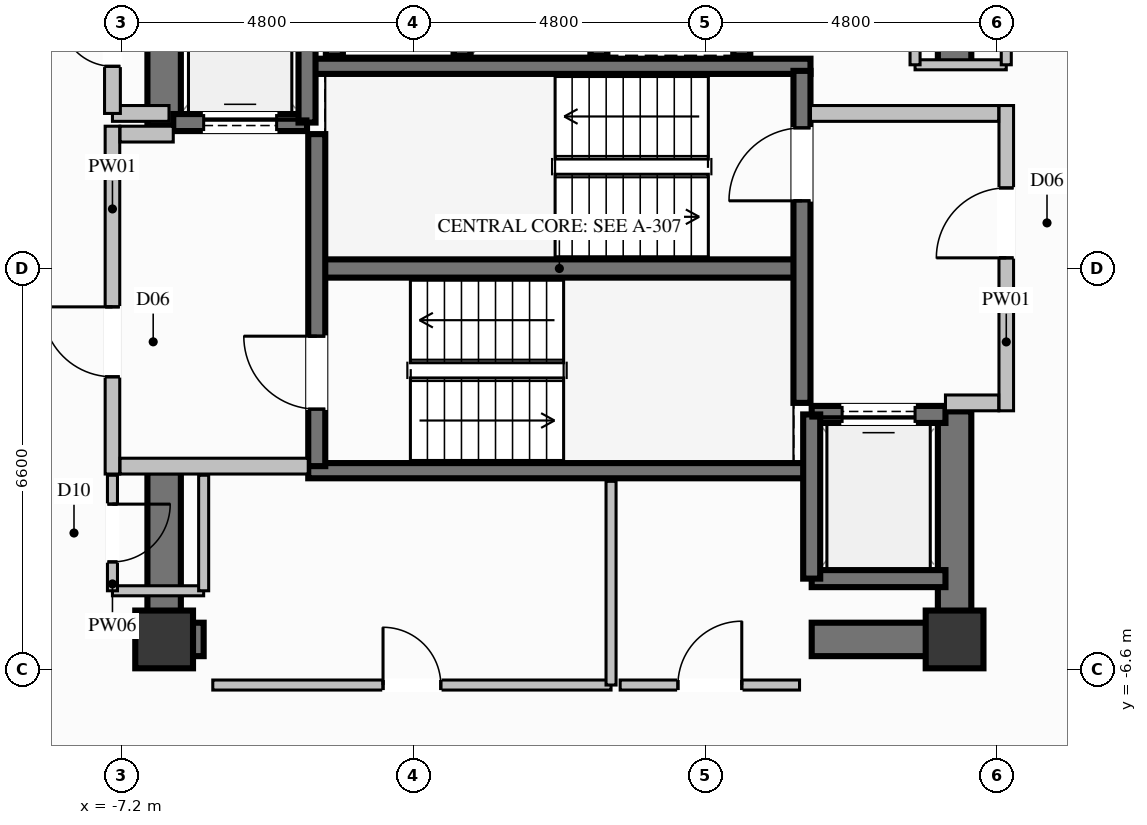
"""IFC4 building model, lengths in metres.
Left out: names, types, materials, properties, quantities, classifications, styles, units other than length and angle.
Written with IfcOpenShell. Run it as: python <this file> out.ifc"""

import sys

from ifc_helpers import new_model, si_unit, direction, frame, frame_2d, origin, origin_2d, place, context, subcontext, project, spatial, rectangle, extrude, element, fill, save


model = new_model("IFC4")
c1 = context("Model", 3, precision=1e-05, world=origin(), true_north=direction((0.0, 1.0)))
c2 = subcontext(c1, "Body", "Model", "MODEL_VIEW")
j1 = project(units=[si_unit("LENGTHUNIT", "METRE"), si_unit("PLANEANGLEUNIT", "RADIAN")], contexts=[c1])
p1 = place(None, origin())
s1 = spatial("IfcSite", under=j1, at=p1, CompositionType="ELEMENT")
p2 = place(p1, origin())
s2 = spatial("IfcBuilding", under=s1, at=p2, CompositionType="ELEMENT")
p3 = place(p2, frame((0.0, 0.0, 205.6)))
s3 = spatial("IfcBuildingStorey", under=s2, at=p3, CompositionType="ELEMENT", Elevation=205.6)
for number, where, z_axis, x_axis in (
    (1, (-6.5, -6.1, 0.0), (0.0, 0.0, 1.0), (1.0, 0.0, 0.0)),
    (2, (6.5, -6.1, 0.0), (0.0, 0.0, 1.0), (1.0, 0.0, 0.0)),
):
    element("IfcColumn", number, at=place(p3, frame(where, z_axis=z_axis, x_axis=x_axis)), inside=s3, PredefinedType="COLUMN", context=c2, shape_type="SweptSolid", body=[
        extrude(rectangle(XDim=0.95, YDim=0.95, at=origin_2d()), origin(), (0.0, 0.0, 1.0), 3.6),
    ])
p4 = place(p3, frame((-3.99, 0.0, 0.0), z_axis=(0.0, 0.0, 1.0), x_axis=(1.0, 0.0, 0.0)))
e3 = element("IfcWall", 3, at=p4, inside=s3, PredefinedType="SHEAR", context=c2, shape_type="SweptSolid", body=[
    extrude(rectangle(XDim=7.98, YDim=0.3, at=frame_2d((3.99, 0.0))), origin(), (0.0, 0.0, 1.0), 3.6),
])
for number, where, z_axis, x_axis in (
    (4, (-4.13, -3.325, 0.0), (0.0, 0.0, 1.0), (1.0, 0.0, 0.0)),
    (5, (-4.13, 3.325, 0.0), (0.0, 0.0, 1.0), (1.0, 0.0, 0.0)),
):
    element("IfcWall", number, at=place(p3, frame(where, z_axis=z_axis, x_axis=x_axis)), inside=s3, PredefinedType="SOLIDWALL", context=c2, shape_type="SweptSolid", body=[
        extrude(rectangle(XDim=8.26, YDim=0.25, at=frame_2d((4.13, 0.0))), origin(), (0.0, 0.0, 1.0), 3.6),
    ])
p5 = place(p3, frame((-6.225, -6.1, 0.0), z_axis=(0.0, 0.0, 1.0), x_axis=(1.0, 0.0, 0.0)))
e6 = element("IfcWall", 6, at=p5, inside=s3, PredefinedType="SHEAR", context=c2, shape_type="SweptSolid", body=[
    extrude(rectangle(XDim=0.375, YDim=0.55, at=frame_2d((0.188, 0.0))), origin(), (0.0, 0.0, 1.0), 3.6),
])
p6 = place(p3, frame((4.15, -6.1, 0.0), z_axis=(0.0, 0.0, 1.0), x_axis=(1.0, 0.0, 0.0)))
e7 = element("IfcWall", 7, at=p6, inside=s3, PredefinedType="SHEAR", context=c2, shape_type="SweptSolid", body=[
    extrude(rectangle(XDim=2.075, YDim=0.55, at=frame_2d((1.038, 0.0))), origin(), (0.0, 0.0, 1.0), 3.6),
])
p7 = place(p3, frame((-6.5, 2.35, 0.0), z_axis=(0.0, 0.0, 1.0), x_axis=(0.0, 1.0, 0.0)))
e8 = element("IfcWall", 8, at=p7, inside=s3, PredefinedType="SHEAR", context=c2, shape_type="SweptSolid", body=[
    extrude(rectangle(XDim=4.025, YDim=0.55, at=frame_2d((2.012, 0.0))), origin(), (0.0, 0.0, 1.0), 3.6),
])
p8 = place(p3, frame((-6.5, -6.375, 0.0), z_axis=(0.0, 0.0, 1.0), x_axis=(0.0, 1.0, 0.0)))
e9 = element("IfcWall", 9, at=p8, inside=s3, PredefinedType="SHEAR", context=c2, shape_type="SweptSolid", body=[
    extrude(rectangle(XDim=3.025, YDim=0.55, at=frame_2d((1.512, 0.0))), origin(), (0.0, 0.0, 1.0), 3.6),
])
p9 = place(p3, frame((6.5, -6.375, 0.0), z_axis=(0.0, 0.0, 1.0), x_axis=(0.0, 1.0, 0.0)))
e10 = element("IfcWall", 10, at=p9, inside=s3, PredefinedType="SHEAR", context=c2, shape_type="SweptSolid", body=[
    extrude(rectangle(XDim=4.025, YDim=0.55, at=frame_2d((2.012, 0.0))), origin(), (0.0, 0.0, 1.0), 3.6),
])
p10 = place(p3, frame((6.5, 3.35, 0.0), z_axis=(0.0, 0.0, 1.0), x_axis=(0.0, 1.0, 0.0)))
e11 = element("IfcWall", 11, at=p10, inside=s3, PredefinedType="SHEAR", context=c2, shape_type="SweptSolid", body=[
    extrude(rectangle(XDim=3.025, YDim=0.55, at=frame_2d((1.512, 0.0))), origin(), (0.0, 0.0, 1.0), 3.6),
])
for number, where, z_axis, x_axis in (
    (12, (-3.7, 6.0, 0.0), (0.0, 0.0, 1.0), (0.0, -1.0, 0.0)),
    (13, (-1.6, 3.5, 0.0), (0.0, 0.0, 1.0), (0.0, 1.0, 0.0)),
    (14, (0.65, 3.5, 0.0), (0.0, 0.0, 1.0), (0.0, 1.0, 0.0)),
    (15, (3.0, 3.5, 0.0), (0.0, 0.0, 1.0), (0.0, 1.0, 0.0)),
):
    element("IfcWall", number, at=place(p3, frame(where, z_axis=z_axis, x_axis=x_axis)), inside=s3, PredefinedType="SOLIDWALL", context=c2, shape_type="SweptSolid", body=[
        extrude(rectangle(XDim=2.5, YDim=0.28, at=frame_2d((1.25, 0.0))), origin(), (0.0, 0.0, 1.0), 3.36),
    ])
p11 = place(p3, frame((-6.35, 2.4, 0.0), z_axis=(0.0, 0.0, 1.0), x_axis=(1.0, 0.0, 0.0)))
e16 = element("IfcWall", 16, at=p11, inside=s3, PredefinedType="SOLIDWALL", context=c2, shape_type="SweptSolid", body=[
    extrude(rectangle(XDim=2.2, YDim=0.28, at=frame_2d((1.1, 0.0))), origin(), (0.0, 0.0, 1.0), 3.36),
])
p12 = place(p11, frame((0.5, 0.0, 0.0)))
e17 = element("IfcOpeningElement", 17, at=p12, cuts=e16, PredefinedType="OPENING", context=c2, shape_type="SweptSolid", body=[
    extrude(rectangle(XDim=1.2, YDim=2.2, at=frame_2d((0.6, 1.1))), frame((0.0, 0.15, 0.0), z_axis=(0.0, -1.0, 0.0), x_axis=(1.0, 0.0, 0.0)), (0.0, 0.0, 1.0), 0.3),
])
p13 = place(p3, frame((-4.15, 2.4, 0.0), z_axis=(0.0, 0.0, 1.0), x_axis=(0.0, 1.0, 0.0)))
e18 = element("IfcWall", 18, at=p13, inside=s3, PredefinedType="SOLIDWALL", context=c2, shape_type="SweptSolid", body=[
    extrude(rectangle(XDim=2.7, YDim=0.28, at=frame_2d((1.35, 0.0))), origin(), (0.0, 0.0, 1.0), 3.36),
])
p14 = place(p3, frame((4.15, -5.1, 0.0), z_axis=(0.0, 0.0, 1.0), x_axis=(1.0, 0.0, 0.0)))
e19 = element("IfcWall", 19, at=p14, inside=s3, PredefinedType="SOLIDWALL", context=c2, shape_type="SweptSolid", body=[
    extrude(rectangle(XDim=2.2, YDim=0.28, at=frame_2d((1.1, 0.0))), origin(), (0.0, 0.0, 1.0), 3.36),
])
p15 = place(p3, frame((6.35, -2.4, 0.0), z_axis=(0.0, 0.0, 1.0), x_axis=(-1.0, 0.0, 0.0)))
e20 = element("IfcWall", 20, at=p15, inside=s3, PredefinedType="SOLIDWALL", context=c2, shape_type="SweptSolid", body=[
    extrude(rectangle(XDim=2.2, YDim=0.28, at=frame_2d((1.1, 0.0))), origin(), (0.0, 0.0, 1.0), 3.36),
])
p16 = place(p15, frame((0.5, 0.0, 0.0)))
e21 = element("IfcOpeningElement", 21, at=p16, cuts=e20, PredefinedType="OPENING", context=c2, shape_type="SweptSolid", body=[
    extrude(rectangle(XDim=1.2, YDim=2.2, at=frame_2d((0.6, 1.1))), frame((0.0, 0.15, 0.0), z_axis=(0.0, -1.0, 0.0), x_axis=(1.0, 0.0, 0.0)), (0.0, 0.0, 1.0), 0.3),
])
p17 = place(p3, frame((4.15, -2.4, 0.0), z_axis=(0.0, 0.0, 1.0), x_axis=(0.0, -1.0, 0.0)))
e22 = element("IfcWall", 22, at=p17, inside=s3, PredefinedType="SOLIDWALL", context=c2, shape_type="SweptSolid", body=[
    extrude(rectangle(XDim=2.7, YDim=0.28, at=frame_2d((1.35, 0.0))), origin(), (0.0, 0.0, 1.0), 3.36),
])
p18 = place(p3, frame((-3.99, -3.25, 0.0), z_axis=(0.0, 0.0, 1.0), x_axis=(0.0, 1.0, 0.0)))
e23 = element("IfcWall", 23, at=p18, inside=s3, PredefinedType="SOLIDWALL", context=c2, shape_type="SweptSolid", body=[
    extrude(rectangle(XDim=5.46, YDim=0.28, at=frame_2d((2.73, 0.0))), origin(), (0.0, 0.0, 1.0), 3.36),
])
p19 = place(p18, frame((0.937, 0.0, 0.0)))
e24 = element("IfcOpeningElement", 24, at=p19, cuts=e23, PredefinedType="OPENING", context=c2, shape_type="SweptSolid", body=[
    extrude(rectangle(XDim=1.2, YDim=2.2, at=frame_2d((0.6, 1.1))), frame((0.0, 0.15, 0.0), z_axis=(0.0, -1.0, 0.0), x_axis=(1.0, 0.0, 0.0)), (0.0, 0.0, 1.0), 0.3),
])
p20 = place(p3, frame((3.99, -2.21, 0.0), z_axis=(0.0, 0.0, 1.0), x_axis=(0.0, 1.0, 0.0)))
e25 = element("IfcWall", 25, at=p20, inside=s3, PredefinedType="SOLIDWALL", context=c2, shape_type="SweptSolid", body=[
    extrude(rectangle(XDim=5.46, YDim=0.28, at=frame_2d((2.73, 0.0))), origin(), (0.0, 0.0, 1.0), 3.36),
])
p21 = place(p20, frame((3.323, 0.0, 0.0)))
e26 = element("IfcOpeningElement", 26, at=p21, cuts=e25, PredefinedType="OPENING", context=c2, shape_type="SweptSolid", body=[
    extrude(rectangle(XDim=1.2, YDim=2.2, at=frame_2d((0.6, 1.1))), frame((0.0, 0.15, 0.0), z_axis=(0.0, -1.0, 0.0), x_axis=(1.0, 0.0, 0.0)), (0.0, 0.0, 1.0), 0.3),
])
p22 = place(p3, frame((-7.35, -3.38, 0.0), z_axis=(0.0, 0.0, 1.0), x_axis=(0.0, 1.0, 0.0)))
e27 = element("IfcWall", 27, at=p22, inside=s3, PredefinedType="PARTITIONING", context=c2, shape_type="SweptSolid", body=[
    extrude(rectangle(XDim=5.72, YDim=0.24, at=frame_2d((2.86, 0.0))), origin(), (0.0, 0.0, 1.0), 2.445),
])
p23 = place(p22, frame((1.599, 0.0, 0.0)))
e28 = element("IfcOpeningElement", 28, at=p23, cuts=e27, PredefinedType="OPENING", context=c2, shape_type="SweptSolid", body=[
    extrude(rectangle(XDim=1.15, YDim=2.2, at=frame_2d((0.575, 1.1))), frame((0.0, 0.13, 0.0), z_axis=(0.0, -1.0, 0.0), x_axis=(1.0, 0.0, 0.0)), (0.0, 0.0, 1.0), 0.26),
])
p24 = place(p3, frame((-7.225, -3.25, 0.0), z_axis=(0.0, 0.0, 1.0), x_axis=(1.0, 0.0, 0.0)))
e29 = element("IfcWall", 29, at=p24, inside=s3, PredefinedType="PARTITIONING", context=c2, shape_type="SweptSolid", body=[
    extrude(rectangle(XDim=3.095, YDim=0.26, at=frame_2d((1.548, 0.0))), origin(), (0.0, 0.0, 1.0), 3.36),
])
p25 = place(p3, frame((-7.225, 2.21, 0.0), z_axis=(0.0, 0.0, 1.0), x_axis=(1.0, 0.0, 0.0)))
e30 = element("IfcWall", 30, at=p25, inside=s3, PredefinedType="PARTITIONING", context=c2, shape_type="SweptSolid", body=[
    extrude(rectangle(XDim=0.875, YDim=0.26, at=frame_2d((0.438, 0.0))), origin(), (0.0, 0.0, 1.0), 3.36),
])
p26 = place(p3, frame((7.35, -2.34, 0.0), z_axis=(0.0, 0.0, 1.0), x_axis=(0.0, 1.0, 0.0)))
e31 = element("IfcWall", 31, at=p26, inside=s3, PredefinedType="PARTITIONING", context=c2, shape_type="SweptSolid", body=[
    extrude(rectangle(XDim=5.02, YDim=0.24, at=frame_2d((2.51, 0.0))), origin(), (0.0, 0.0, 1.0), 2.445),
])
p27 = place(p26, frame((2.515, 0.0, 0.0)))
e32 = element("IfcOpeningElement", 32, at=p27, cuts=e31, PredefinedType="OPENING", context=c2, shape_type="SweptSolid", body=[
    extrude(rectangle(XDim=1.15, YDim=2.2, at=frame_2d((0.575, 1.1))), frame((0.0, 0.13, 0.0), z_axis=(0.0, -1.0, 0.0), x_axis=(1.0, 0.0, 0.0)), (0.0, 0.0, 1.0), 0.26),
])
p28 = place(p3, frame((6.35, -2.21, 0.0), z_axis=(0.0, 0.0, 1.0), x_axis=(1.0, 0.0, 0.0)))
e33 = element("IfcWall", 33, at=p28, inside=s3, PredefinedType="PARTITIONING", context=c2, shape_type="SweptSolid", body=[
    extrude(rectangle(XDim=0.875, YDim=0.26, at=frame_2d((0.438, 0.0))), origin(), (0.0, 0.0, 1.0), 3.36),
])
p29 = place(p3, frame((4.13, 2.55, 0.0), z_axis=(0.0, 0.0, 1.0), x_axis=(1.0, 0.0, 0.0)))
e34 = element("IfcWall", 34, at=p29, inside=s3, PredefinedType="PARTITIONING", context=c2, shape_type="SweptSolid", body=[
    extrude(rectangle(XDim=3.095, YDim=0.26, at=frame_2d((1.548, 0.0))), origin(), (0.0, 0.0, 1.0), 3.36),
])
p30 = place(p3, frame((-7.35, 2.55, 0.0), z_axis=(0.0, 0.0, 1.0), x_axis=(1.0, 0.0, 0.0)))
e35 = element("IfcWall", 35, at=p30, inside=s3, PredefinedType="PARTITIONING", context=c2, shape_type="SweptSolid", body=[
    extrude(rectangle(XDim=0.93, YDim=0.26, at=frame_2d((0.465, 0.0))), origin(), (0.0, 0.0, 1.0), 3.36),
])
p31 = place(p3, frame((-7.35, 2.55, 0.0), z_axis=(0.0, 0.0, 1.0), x_axis=(0.0, 1.0, 0.0)))
e36 = element("IfcWall", 36, at=p31, inside=s3, PredefinedType="PARTITIONING", context=c2, shape_type="SweptSolid", body=[
    extrude(rectangle(XDim=2.4, YDim=0.26, at=frame_2d((1.2, 0.0))), origin(), (0.0, 0.0, 1.0), 2.445),
])
p32 = place(p31, frame((0.775, 0.0, 0.0)))
e37 = element("IfcOpeningElement", 37, at=p32, cuts=e36, PredefinedType="OPENING", context=c2, shape_type="SweptSolid", body=[
    extrude(rectangle(XDim=0.85, YDim=2.05, at=frame_2d((0.425, 1.025))), frame((0.0, 0.14, 0.0), z_axis=(0.0, -1.0, 0.0), x_axis=(1.0, 0.0, 0.0)), (0.0, 0.0, 1.0), 0.28),
])
p33 = place(p3, frame((-7.35, -5.3, 0.0), z_axis=(0.0, 0.0, 1.0), x_axis=(1.0, 0.0, 0.0)))
e38 = element("IfcWall", 38, at=p33, inside=s3, PredefinedType="PARTITIONING", context=c2, shape_type="SweptSolid", body=[
    extrude(rectangle(XDim=1.5, YDim=0.165, at=frame_2d((0.75, 0.0))), origin(), (0.0, 0.0, 1.0), 2.445),
])
p34 = place(p3, frame((-5.85, -5.3, 0.0), z_axis=(0.0, 0.0, 1.0), x_axis=(0.0, 1.0, 0.0)))
e39 = element("IfcWall", 39, at=p34, inside=s3, PredefinedType="PARTITIONING", context=c2, shape_type="SweptSolid", body=[
    extrude(rectangle(XDim=1.9, YDim=0.165, at=frame_2d((0.95, 0.0))), origin(), (0.0, 0.0, 1.0), 2.445),
])
p35 = place(p3, frame((-7.35, -3.4, 0.0), z_axis=(0.0, 0.0, 1.0), x_axis=(0.0, -1.0, 0.0)))
e40 = element("IfcWall", 40, at=p35, inside=s3, PredefinedType="PARTITIONING", context=c2, shape_type="SweptSolid", body=[
    extrude(rectangle(XDim=1.9, YDim=0.165, at=frame_2d((0.95, 0.0))), origin(), (0.0, 0.0, 1.0), 3.36),
])
p36 = place(p35, frame((0.475, 0.0, 0.0)))
e41 = element("IfcOpeningElement", 41, at=p36, cuts=e40, PredefinedType="OPENING", context=c2, shape_type="SweptSolid", body=[
    extrude(rectangle(XDim=0.95, YDim=2.1, at=frame_2d((0.475, 1.05))), frame((0.0, 0.093, 0.0), z_axis=(0.0, -1.0, 0.0), x_axis=(1.0, 0.0, 0.0)), (0.0, 0.0, 1.0), 0.185),
])
p37 = place(p3, frame((5.85, 3.35, 0.0), z_axis=(0.0, 0.0, 1.0), x_axis=(1.0, 0.0, 0.0)))
e42 = element("IfcWall", 42, at=p37, inside=s3, PredefinedType="PARTITIONING", context=c2, shape_type="SweptSolid", body=[
    extrude(rectangle(XDim=1.5, YDim=0.165, at=frame_2d((0.75, 0.0))), origin(), (0.0, 0.0, 1.0), 3.36),
])
p38 = place(p3, frame((7.35, 3.35, 0.0), z_axis=(0.0, 0.0, 1.0), x_axis=(0.0, 1.0, 0.0)))
e43 = element("IfcWall", 43, at=p38, inside=s3, PredefinedType="PARTITIONING", context=c2, shape_type="SweptSolid", body=[
    extrude(rectangle(XDim=1.95, YDim=0.165, at=frame_2d((0.975, 0.0))), origin(), (0.0, 0.0, 1.0), 3.36),
])
p39 = place(p38, frame((0.5, 0.0, 0.0)))
e44 = element("IfcOpeningElement", 44, at=p39, cuts=e43, PredefinedType="OPENING", context=c2, shape_type="SweptSolid", body=[
    extrude(rectangle(XDim=0.95, YDim=2.1, at=frame_2d((0.475, 1.05))), frame((0.0, 0.093, 0.0), z_axis=(0.0, -1.0, 0.0), x_axis=(1.0, 0.0, 0.0)), (0.0, 0.0, 1.0), 0.185),
])
p40 = place(p3, frame((5.85, 5.3, 0.0), z_axis=(0.0, 0.0, 1.0), x_axis=(0.0, -1.0, 0.0)))
e45 = element("IfcWall", 45, at=p40, inside=s3, PredefinedType="PARTITIONING", context=c2, shape_type="SweptSolid", body=[
    extrude(rectangle(XDim=1.95, YDim=0.165, at=frame_2d((0.975, 0.0))), origin(), (0.0, 0.0, 1.0), 2.445),
])
p41 = place(p3, frame((-5.7, -6.85, 0.0), z_axis=(0.0, 0.0, 1.0), x_axis=(1.0, 0.0, 0.0)))
e46 = element("IfcWall", 46, at=p41, inside=s3, PredefinedType="PARTITIONING", context=c2, shape_type="SweptSolid", body=[
    extrude(rectangle(XDim=6.55, YDim=0.165, at=frame_2d((3.275, 0.0))), origin(), (0.0, 0.0, 1.0), 2.445),
])
p42 = place(p41, frame((2.8, 0.0, 0.0)))
e47 = element("IfcOpeningElement", 47, at=p42, cuts=e46, PredefinedType="OPENING", context=c2, shape_type="SweptSolid", body=[
    extrude(rectangle(XDim=0.95, YDim=2.1, at=frame_2d((0.475, 1.05))), frame((0.0, 0.093, 0.0), z_axis=(0.0, -1.0, 0.0), x_axis=(1.0, 0.0, 0.0)), (0.0, 0.0, 1.0), 0.185),
])
p43 = place(p3, frame((0.85, -6.85, 0.0), z_axis=(0.0, 0.0, 1.0), x_axis=(0.0, 1.0, 0.0)))
e48 = element("IfcWall", 48, at=p43, inside=s3, PredefinedType="PARTITIONING", context=c2, shape_type="SweptSolid", body=[
    extrude(rectangle(XDim=3.35, YDim=0.165, at=frame_2d((1.675, 0.0))), origin(), (0.0, 0.0, 1.0), 3.36),
])
p44 = place(p3, frame((1.0, -6.85, 0.0), z_axis=(0.0, 0.0, 1.0), x_axis=(1.0, 0.0, 0.0)))
e49 = element("IfcWall", 49, at=p44, inside=s3, PredefinedType="PARTITIONING", context=c2, shape_type="SweptSolid", body=[
    extrude(rectangle(XDim=2.95, YDim=0.165, at=frame_2d((1.475, 0.0))), origin(), (0.0, 0.0, 1.0), 2.445),
])
p45 = place(p44, frame((0.95, 0.0, 0.0)))
e50 = element("IfcOpeningElement", 50, at=p45, cuts=e49, PredefinedType="OPENING", context=c2, shape_type="SweptSolid", body=[
    extrude(rectangle(XDim=1.05, YDim=2.15, at=frame_2d((0.525, 1.075))), frame((0.0, 0.093, 0.0), z_axis=(0.0, -1.0, 0.0), x_axis=(1.0, 0.0, 0.0)), (0.0, 0.0, 1.0), 0.185),
])
p46 = place(p12, origin())
e51 = element("IfcDoor", 51, at=p46, inside=s3, OperationType="SLIDING_TO_LEFT", PredefinedType="DOOR", context=c2, shape_type="SweptSolid", body=[
    extrude(rectangle(XDim=1.2, YDim=2.2, at=frame_2d((0.6, 1.1))), frame((0.0, 0.025, 0.0), z_axis=(0.0, -1.0, 0.0), x_axis=(1.0, 0.0, 0.0)), (0.0, 0.0, 1.0), 0.05),
])
fill(e17, e51)
p47 = place(p16, origin())
e52 = element("IfcDoor", 52, at=p47, inside=s3, OperationType="SLIDING_TO_LEFT", PredefinedType="DOOR", context=c2, shape_type="SweptSolid", body=[
    extrude(rectangle(XDim=1.2, YDim=2.2, at=frame_2d((0.6, 1.1))), frame((0.0, 0.025, 0.0), z_axis=(0.0, -1.0, 0.0), x_axis=(1.0, 0.0, 0.0)), (0.0, 0.0, 1.0), 0.05),
])
fill(e21, e52)
p48 = place(p19, origin())
e53 = element("IfcDoor", 53, at=p48, inside=s3, OperationType="SINGLE_SWING_RIGHT", PredefinedType="DOOR", context=c2, shape_type="SweptSolid", body=[
    extrude(rectangle(XDim=1.2, YDim=2.2, at=frame_2d((0.6, 1.1))), frame((0.0, 0.025, 0.0), z_axis=(0.0, -1.0, 0.0), x_axis=(1.0, 0.0, 0.0)), (0.0, 0.0, 1.0), 0.05),
])
fill(e24, e53)
p49 = place(p21, origin())
e54 = element("IfcDoor", 54, at=p49, inside=s3, OperationType="SINGLE_SWING_LEFT", PredefinedType="DOOR", context=c2, shape_type="SweptSolid", body=[
    extrude(rectangle(XDim=1.2, YDim=2.2, at=frame_2d((0.6, 1.1))), frame((0.0, 0.025, 0.0), z_axis=(0.0, -1.0, 0.0), x_axis=(1.0, 0.0, 0.0)), (0.0, 0.0, 1.0), 0.05),
])
fill(e26, e54)
p50 = place(p23, origin())
e55 = element("IfcDoor", 55, at=p50, inside=s3, OperationType="SINGLE_SWING_RIGHT", PredefinedType="DOOR", context=c2, shape_type="SweptSolid", body=[
    extrude(rectangle(XDim=1.15, YDim=2.2, at=frame_2d((0.575, 1.1))), frame((0.0, 0.025, 0.0), z_axis=(0.0, -1.0, 0.0), x_axis=(1.0, 0.0, 0.0)), (0.0, 0.0, 1.0), 0.05),
])
fill(e28, e55)
p51 = place(p27, origin())
e56 = element("IfcDoor", 56, at=p51, inside=s3, OperationType="SINGLE_SWING_LEFT", PredefinedType="DOOR", context=c2, shape_type="SweptSolid", body=[
    extrude(rectangle(XDim=1.15, YDim=2.2, at=frame_2d((0.575, 1.1))), frame((0.0, 0.025, 0.0), z_axis=(0.0, -1.0, 0.0), x_axis=(1.0, 0.0, 0.0)), (0.0, 0.0, 1.0), 0.05),
])
fill(e32, e56)
p52 = place(p32, origin())
e57 = element("IfcDoor", 57, at=p52, inside=s3, OperationType="SINGLE_SWING_RIGHT", PredefinedType="DOOR", context=c2, shape_type="SweptSolid", body=[
    extrude(rectangle(XDim=0.85, YDim=2.05, at=frame_2d((0.425, 1.025))), frame((0.0, 0.025, 0.0), z_axis=(0.0, -1.0, 0.0), x_axis=(1.0, 0.0, 0.0)), (0.0, 0.0, 1.0), 0.05),
])
fill(e37, e57)
p53 = place(p36, origin())
e58 = element("IfcDoor", 58, at=p53, inside=s3, OperationType="SINGLE_SWING_LEFT", PredefinedType="DOOR", context=c2, shape_type="SweptSolid", body=[
    extrude(rectangle(XDim=0.95, YDim=2.1, at=frame_2d((0.475, 1.05))), frame((0.0, 0.025, 0.0), z_axis=(0.0, -1.0, 0.0), x_axis=(1.0, 0.0, 0.0)), (0.0, 0.0, 1.0), 0.05),
])
fill(e41, e58)
p54 = place(p42, origin())
e59 = element("IfcDoor", 59, at=p54, inside=s3, OperationType="SINGLE_SWING_LEFT", PredefinedType="DOOR", context=c2, shape_type="SweptSolid", body=[
    extrude(rectangle(XDim=0.95, YDim=2.1, at=frame_2d((0.475, 1.05))), frame((0.0, 0.025, 0.0), z_axis=(0.0, -1.0, 0.0), x_axis=(1.0, 0.0, 0.0)), (0.0, 0.0, 1.0), 0.05),
])
fill(e47, e59)
p55 = place(p45, origin())
e60 = element("IfcDoor", 60, at=p55, inside=s3, OperationType="SINGLE_SWING_RIGHT", PredefinedType="DOOR", context=c2, shape_type="SweptSolid", body=[
    extrude(rectangle(XDim=1.05, YDim=2.15, at=frame_2d((0.525, 1.075))), frame((0.0, 0.025, 0.0), z_axis=(0.0, -1.0, 0.0), x_axis=(1.0, 0.0, 0.0)), (0.0, 0.0, 1.0), 0.05),
])
fill(e50, e60)
save(model, sys.argv[1])
